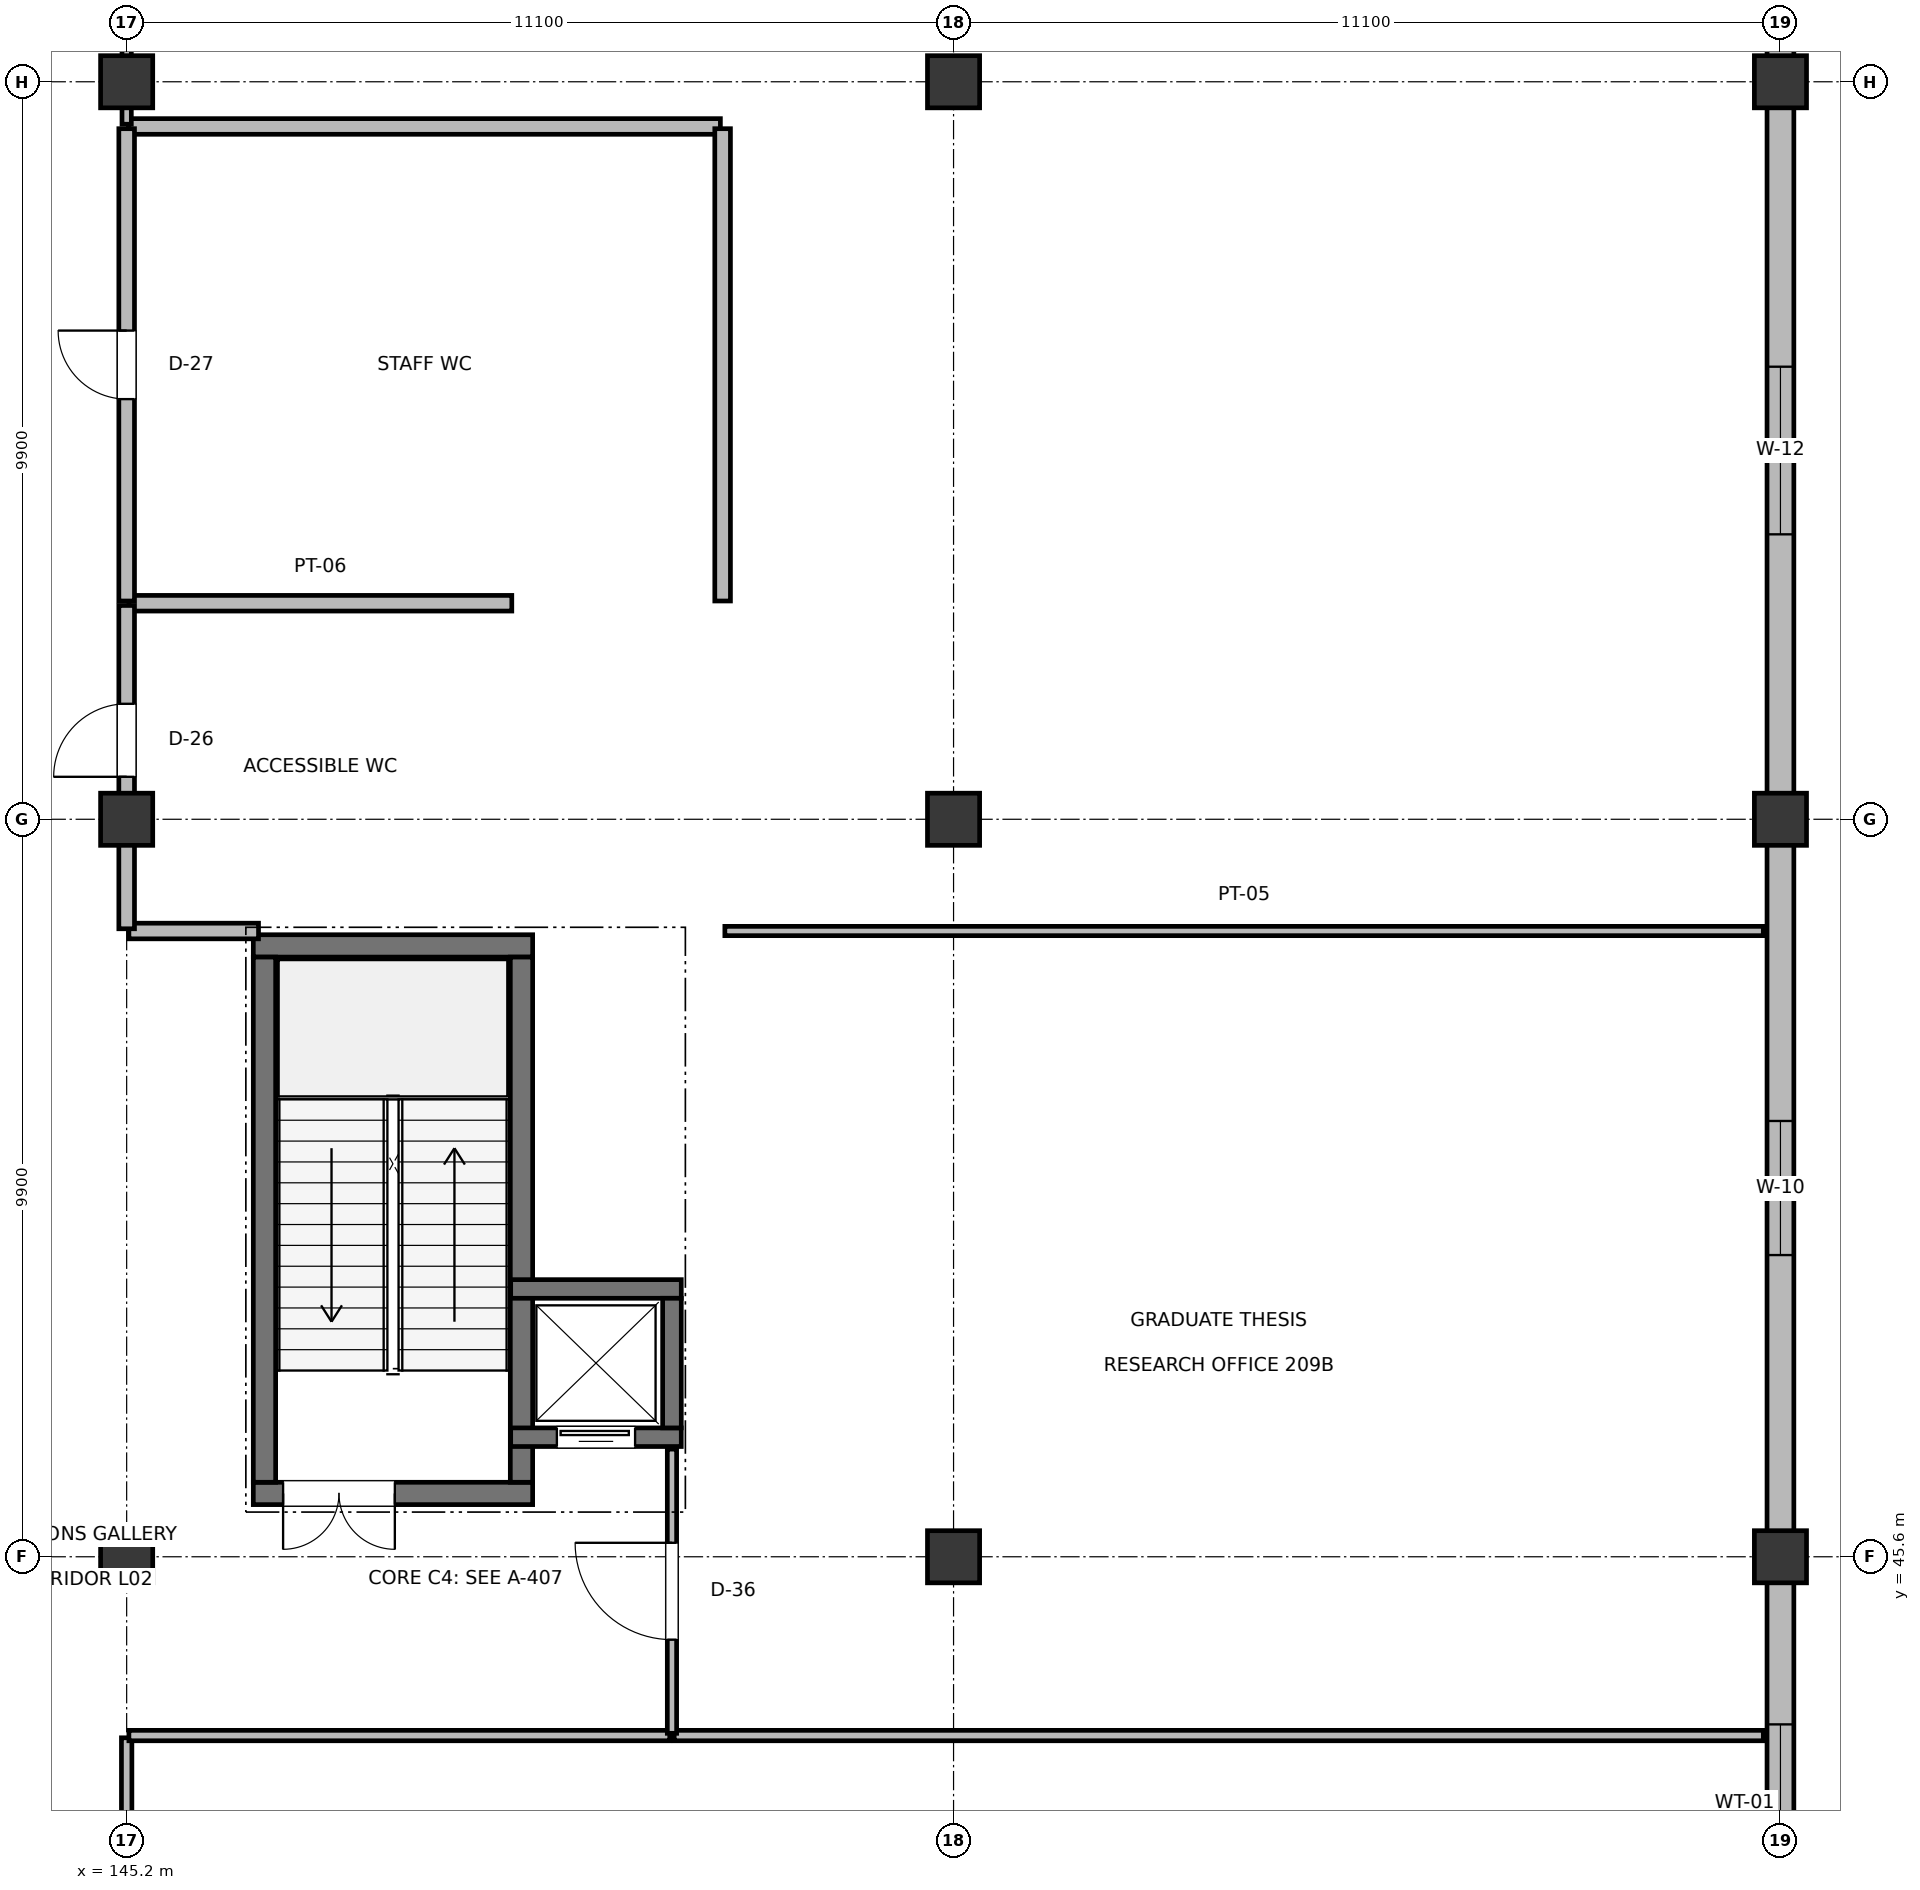
"""IFC4 building model, lengths in metres.
Left out: names, types, materials, properties, quantities, classifications, styles, units other than length and angle.
Written with IfcOpenShell. Run it as: python <this file> out.ifc"""

import sys

from ifc_helpers import new_model, si_unit, direction, frame, frame_2d, origin, origin_2d, place, context, subcontext, project, spatial, rectangle, extrude, element, fill, save


model = new_model("IFC4")
c1 = context("Model", 3, precision=1e-05, world=origin(), true_north=direction((0.0, 1.0)))
c2 = subcontext(c1, "Body", "Model", "MODEL_VIEW")
j1 = project(units=[si_unit("LENGTHUNIT", "METRE"), si_unit("PLANEANGLEUNIT", "RADIAN")], contexts=[c1])
p1 = place(None, origin())
s1 = spatial("IfcSite", under=j1, at=p1, CompositionType="ELEMENT")
p2 = place(p1, origin())
s2 = spatial("IfcBuilding", under=s1, at=p2, CompositionType="ELEMENT")
p3 = place(p2, frame((0.0, 0.0, 10.2)))
s3 = spatial("IfcBuildingStorey", under=s2, at=p3, CompositionType="ELEMENT", Elevation=10.2)
for number, where, z_axis, x_axis in (
    (1, (145.2, 45.6, 0.0), (0.0, 0.0, 1.0), (1.0, 0.0, 0.0)),
    (2, (145.2, 55.5, 0.0), (0.0, 0.0, 1.0), (1.0, 0.0, 0.0)),
    (3, (145.2, 65.4, 0.0), (0.0, 0.0, 1.0), (1.0, 0.0, 0.0)),
    (4, (156.3, 45.6, 0.0), (0.0, 0.0, 1.0), (1.0, 0.0, 0.0)),
    (5, (156.3, 55.5, 0.0), (0.0, 0.0, 1.0), (1.0, 0.0, 0.0)),
    (6, (156.3, 65.4, 0.0), (0.0, 0.0, 1.0), (1.0, 0.0, 0.0)),
    (7, (167.4, 45.6, 0.0), (0.0, 0.0, 1.0), (1.0, 0.0, 0.0)),
    (8, (167.4, 55.5, 0.0), (0.0, 0.0, 1.0), (1.0, 0.0, 0.0)),
    (9, (167.4, 65.4, 0.0), (0.0, 0.0, 1.0), (1.0, 0.0, 0.0)),
):
    element("IfcColumn", number, at=place(p3, frame(where, z_axis=z_axis, x_axis=x_axis)), inside=s3, PredefinedType="COLUMN", context=c2, shape_type="SweptSolid", body=[
        extrude(rectangle(XDim=0.7, YDim=0.7, at=origin_2d()), origin(), (0.0, 0.0, 1.0), 4.8),
    ])
p4 = place(p3, frame((167.4, 39.335, 0.0), z_axis=(0.0, 0.0, 1.0), x_axis=(0.0, 1.0, 0.0)))
e10 = element("IfcWall", 10, at=p4, inside=s3, PredefinedType="SOLIDWALL", context=c2, shape_type="SweptSolid", body=[
    extrude(rectangle(XDim=5.93, YDim=0.36, at=frame_2d((2.965, 0.0))), origin(), (0.0, 0.0, 1.0), 3.815),
])
p5 = place(p4, frame((1.915, 0.0, 0.85)))
e11 = element("IfcOpeningElement", 11, at=p5, cuts=e10, PredefinedType="OPENING", context=c2, shape_type="SweptSolid", body=[
    extrude(rectangle(XDim=2.1, YDim=1.9, at=frame_2d((1.05, 0.95))), frame((0.0, 0.19, 0.0), z_axis=(0.0, -1.0, 0.0), x_axis=(1.0, 0.0, 0.0)), (0.0, 0.0, 1.0), 0.38),
])
p6 = place(p3, frame((167.4, 45.935, 0.0), z_axis=(0.0, 0.0, 1.0), x_axis=(0.0, 1.0, 0.0)))
e12 = element("IfcWall", 12, at=p6, inside=s3, PredefinedType="SOLIDWALL", context=c2, shape_type="SweptSolid", body=[
    extrude(rectangle(XDim=9.23, YDim=0.36, at=frame_2d((4.615, 0.0))), origin(), (0.0, 0.0, 1.0), 3.815),
])
p7 = place(p6, frame((3.715, 0.0, 0.85)))
e13 = element("IfcOpeningElement", 13, at=p7, cuts=e12, PredefinedType="OPENING", context=c2, shape_type="SweptSolid", body=[
    extrude(rectangle(XDim=1.8, YDim=1.75, at=frame_2d((0.9, 0.875))), frame((0.0, 0.19, 0.0), z_axis=(0.0, -1.0, 0.0), x_axis=(1.0, 0.0, 0.0)), (0.0, 0.0, 1.0), 0.38),
])
p8 = place(p3, frame((167.4, 55.835, 0.0), z_axis=(0.0, 0.0, 1.0), x_axis=(0.0, 1.0, 0.0)))
e14 = element("IfcWall", 14, at=p8, inside=s3, PredefinedType="SOLIDWALL", context=c2, shape_type="SweptSolid", body=[
    extrude(rectangle(XDim=9.23, YDim=0.36, at=frame_2d((4.615, 0.0))), origin(), (0.0, 0.0, 1.0), 3.815),
])
p9 = place(p8, frame((3.49, 0.0, 0.85)))
e15 = element("IfcOpeningElement", 15, at=p9, cuts=e14, PredefinedType="OPENING", context=c2, shape_type="SweptSolid", body=[
    extrude(rectangle(XDim=2.25, YDim=1.85, at=frame_2d((1.125, 0.925))), frame((0.0, 0.19, 0.0), z_axis=(0.0, -1.0, 0.0), x_axis=(1.0, 0.0, 0.0)), (0.0, 0.0, 1.0), 0.38),
])
p10 = place(p3, frame((167.4, 65.735, 0.0), z_axis=(0.0, 0.0, 1.0), x_axis=(0.0, 1.0, 0.0)))
e16 = element("IfcWall", 16, at=p10, inside=s3, PredefinedType="SOLIDWALL", context=c2, shape_type="SweptSolid", body=[
    extrude(rectangle(XDim=10.13, YDim=0.36, at=frame_2d((5.065, 0.0))), origin(), (0.0, 0.0, 1.0), 3.815),
])
p11 = place(p10, frame((4.24, 0.0, 0.85)))
e17 = element("IfcOpeningElement", 17, at=p11, cuts=e16, PredefinedType="OPENING", context=c2, shape_type="SweptSolid", body=[
    extrude(rectangle(XDim=1.65, YDim=1.65, at=frame_2d((0.825, 0.825))), frame((0.0, 0.19, 0.0), z_axis=(0.0, -1.0, 0.0), x_axis=(1.0, 0.0, 0.0)), (0.0, 0.0, 1.0), 0.38),
])
p12 = place(p3, frame((146.9, 46.45, 0.0), z_axis=(0.0, 0.0, 1.0), x_axis=(1.0, 0.0, 0.0)))
e18 = element("IfcWall", 18, at=p12, inside=s3, PredefinedType="SHEAR", context=c2, shape_type="SweptSolid", body=[
    extrude(rectangle(XDim=3.75, YDim=0.3, at=frame_2d((1.875, 0.0))), origin(), (0.0, 0.0, 1.0), 4.58),
])
p13 = place(p12, frame((0.4, 0.0, 0.0)))
e19 = element("IfcOpeningElement", 19, at=p13, cuts=e18, PredefinedType="OPENING", context=c2, shape_type="SweptSolid", body=[
    extrude(rectangle(XDim=1.5, YDim=2.2, at=frame_2d((0.75, 1.1))), frame((0.0, 0.16, 0.0), z_axis=(0.0, -1.0, 0.0), x_axis=(1.0, 0.0, 0.0)), (0.0, 0.0, 1.0), 0.32),
])
p14 = place(p3, frame((146.9, 53.8, 0.0), z_axis=(0.0, 0.0, 1.0), x_axis=(1.0, 0.0, 0.0)))
e20 = element("IfcWall", 20, at=p14, inside=s3, PredefinedType="SHEAR", context=c2, shape_type="SweptSolid", body=[
    extrude(rectangle(XDim=3.75, YDim=0.3, at=frame_2d((1.875, 0.0))), origin(), (0.0, 0.0, 1.0), 4.58),
])
for number, where, z_axis, x_axis in (
    (21, (147.05, 46.6, 0.0), (0.0, 0.0, 1.0), (0.0, 1.0, 0.0)),
    (22, (150.5, 46.6, 0.0), (0.0, 0.0, 1.0), (0.0, 1.0, 0.0)),
):
    element("IfcWall", number, at=place(p3, frame(where, z_axis=z_axis, x_axis=x_axis)), inside=s3, PredefinedType="SHEAR", context=c2, shape_type="SweptSolid", body=[
        extrude(rectangle(XDim=7.05, YDim=0.3, at=frame_2d((3.525, 0.0))), origin(), (0.0, 0.0, 1.0), 4.58),
    ])
p15 = place(p3, frame((150.355, 47.205, 0.0), z_axis=(0.0, 0.0, 1.0), x_axis=(1.0, 0.0, 0.0)))
e23 = element("IfcWall", 23, at=p15, inside=s3, PredefinedType="SHEAR", context=c2, shape_type="SweptSolid", body=[
    extrude(rectangle(XDim=2.29, YDim=0.25, at=frame_2d((1.145, 0.0))), origin(), (0.0, 0.0, 1.0), 4.56),
])
p16 = place(p15, frame((0.62, 0.0, 0.0)))
e24 = element("IfcOpeningElement", 24, at=p16, cuts=e23, PredefinedType="OPENING", context=c2, shape_type="SweptSolid", body=[
    extrude(rectangle(XDim=1.05, YDim=2.15, at=frame_2d((0.525, 1.075))), frame((0.0, 0.135, 0.0), z_axis=(0.0, -1.0, 0.0), x_axis=(1.0, 0.0, 0.0)), (0.0, 0.0, 1.0), 0.27),
])
p17 = place(p3, frame((150.355, 49.195, 0.0), z_axis=(0.0, 0.0, 1.0), x_axis=(1.0, 0.0, 0.0)))
e25 = element("IfcWall", 25, at=p17, inside=s3, PredefinedType="SHEAR", context=c2, shape_type="SweptSolid", body=[
    extrude(rectangle(XDim=2.29, YDim=0.25, at=frame_2d((1.145, 0.0))), origin(), (0.0, 0.0, 1.0), 4.56),
])
p18 = place(p3, frame((152.52, 47.33, 0.0), z_axis=(0.0, 0.0, 1.0), x_axis=(0.0, 1.0, 0.0)))
e26 = element("IfcWall", 26, at=p18, inside=s3, PredefinedType="SHEAR", context=c2, shape_type="SweptSolid", body=[
    extrude(rectangle(XDim=1.74, YDim=0.25, at=frame_2d((0.87, 0.0))), origin(), (0.0, 0.0, 1.0), 4.56),
])
p19 = place(p3, frame((152.55, 43.2, 0.0), z_axis=(0.0, 0.0, 1.0), x_axis=(1.0, 0.0, 0.0)))
e27 = element("IfcWall", 27, at=p19, inside=s3, PredefinedType="PARTITIONING", context=c2, shape_type="SweptSolid", body=[
    extrude(rectangle(XDim=14.62, YDim=0.14, at=frame_2d((7.31, 0.0))), origin(), (0.0, 0.0, 1.0), 3.815),
])
p20 = place(p3, frame((145.2, 12.23, 0.0), z_axis=(0.0, 0.0, 1.0), x_axis=(0.0, 1.0, 0.0)))
e28 = element("IfcWall", 28, at=p20, inside=s3, PredefinedType="PARTITIONING", context=c2, shape_type="SweptSolid", body=[
    extrude(rectangle(XDim=30.94, YDim=0.14, at=frame_2d((15.47, 0.0))), origin(), (0.0, 0.0, 1.0), 3.665),
])
p21 = place(p20, frame((15.02, 0.0, 0.0)))
e29 = element("IfcOpeningElement", 29, at=p21, cuts=e28, PredefinedType="OPENING", context=c2, shape_type="SweptSolid", body=[
    extrude(rectangle(XDim=0.9, YDim=2.05, at=frame_2d((0.45, 1.025))), frame((0.0, 0.08, 0.0), z_axis=(0.0, -1.0, 0.0), x_axis=(1.0, 0.0, 0.0)), (0.0, 0.0, 1.0), 0.16),
])
p22 = place(p3, frame((145.23, 43.2, 0.0), z_axis=(0.0, 0.0, 1.0), x_axis=(1.0, 0.0, 0.0)))
e30 = element("IfcWall", 30, at=p22, inside=s3, PredefinedType="PARTITIONING", context=c2, shape_type="SweptSolid", body=[
    extrude(rectangle(XDim=7.26, YDim=0.14, at=frame_2d((3.63, 0.0))), origin(), (0.0, 0.0, 1.0), 3.865),
])
p23 = place(p3, frame((153.23, 54.0, 0.0), z_axis=(0.0, 0.0, 1.0), x_axis=(1.0, 0.0, 0.0)))
e31 = element("IfcWall", 31, at=p23, inside=s3, PredefinedType="PARTITIONING", context=c2, shape_type="SweptSolid", body=[
    extrude(rectangle(XDim=13.94, YDim=0.125, at=frame_2d((6.97, 0.0))), origin(), (0.0, 0.0, 1.0), 3.665),
])
p24 = place(p3, frame((152.52, 43.23, 0.0), z_axis=(0.0, 0.0, 1.0), x_axis=(0.0, 1.0, 0.0)))
e32 = element("IfcWall", 32, at=p24, inside=s3, PredefinedType="PARTITIONING", context=c2, shape_type="SweptSolid", body=[
    extrude(rectangle(XDim=3.815, YDim=0.125, at=frame_2d((1.907, 0.0))), origin(), (0.0, 0.0, 1.0), 3.935),
])
p25 = place(p24, frame((1.258, 0.0, 0.0)))
e33 = element("IfcOpeningElement", 33, at=p25, cuts=e32, PredefinedType="OPENING", context=c2, shape_type="SweptSolid", body=[
    extrude(rectangle(XDim=1.3, YDim=2.2, at=frame_2d((0.65, 1.1))), frame((0.0, 0.073, 0.0), z_axis=(0.0, -1.0, 0.0), x_axis=(1.0, 0.0, 0.0)), (0.0, 0.0, 1.0), 0.145),
])
p26 = place(p3, frame((145.23, 58.4, 0.0), z_axis=(0.0, 0.0, 1.0), x_axis=(1.0, 0.0, 0.0)))
e34 = element("IfcWall", 34, at=p26, inside=s3, PredefinedType="PLUMBINGWALL", context=c2, shape_type="SweptSolid", body=[
    extrude(rectangle(XDim=5.14, YDim=0.21, at=frame_2d((2.57, 0.0))), origin(), (0.0, 0.0, 1.0), 3.665),
])
p27 = place(p3, frame((145.23, 54.0, 0.0), z_axis=(0.0, 0.0, 1.0), x_axis=(1.0, 0.0, 0.0)))
e35 = element("IfcWall", 35, at=p27, inside=s3, PredefinedType="PLUMBINGWALL", context=c2, shape_type="SweptSolid", body=[
    extrude(rectangle(XDim=1.74, YDim=0.21, at=frame_2d((0.87, 0.0))), origin(), (0.0, 0.0, 1.0), 3.665),
])
p28 = place(p3, frame((145.2, 54.03, 0.0), z_axis=(0.0, 0.0, 1.0), x_axis=(0.0, 1.0, 0.0)))
e36 = element("IfcWall", 36, at=p28, inside=s3, PredefinedType="PLUMBINGWALL", context=c2, shape_type="SweptSolid", body=[
    extrude(rectangle(XDim=4.34, YDim=0.21, at=frame_2d((2.17, 0.0))), origin(), (0.0, 0.0, 1.0), 3.665),
])
p29 = place(p28, frame((2.04, 0.0, 0.0)))
e37 = element("IfcOpeningElement", 37, at=p29, cuts=e36, PredefinedType="OPENING", context=c2, shape_type="SweptSolid", body=[
    extrude(rectangle(XDim=0.98, YDim=2.1, at=frame_2d((0.49, 1.05))), frame((0.0, 0.115, 0.0), z_axis=(0.0, -1.0, 0.0), x_axis=(1.0, 0.0, 0.0)), (0.0, 0.0, 1.0), 0.23),
])
p30 = place(p3, frame((145.23, 64.8, 0.0), z_axis=(0.0, 0.0, 1.0), x_axis=(1.0, 0.0, 0.0)))
e38 = element("IfcWall", 38, at=p30, inside=s3, PredefinedType="PLUMBINGWALL", context=c2, shape_type="SweptSolid", body=[
    extrude(rectangle(XDim=7.94, YDim=0.21, at=frame_2d((3.97, 0.0))), origin(), (0.0, 0.0, 1.0), 3.665),
])
p31 = place(p3, frame((153.2, 58.43, 0.0), z_axis=(0.0, 0.0, 1.0), x_axis=(0.0, 1.0, 0.0)))
e39 = element("IfcWall", 39, at=p31, inside=s3, PredefinedType="PLUMBINGWALL", context=c2, shape_type="SweptSolid", body=[
    extrude(rectangle(XDim=6.34, YDim=0.21, at=frame_2d((3.17, 0.0))), origin(), (0.0, 0.0, 1.0), 4.48),
])
p32 = place(p3, frame((145.2, 58.43, 0.0), z_axis=(0.0, 0.0, 1.0), x_axis=(0.0, 1.0, 0.0)))
e40 = element("IfcWall", 40, at=p32, inside=s3, PredefinedType="PLUMBINGWALL", context=c2, shape_type="SweptSolid", body=[
    extrude(rectangle(XDim=6.34, YDim=0.21, at=frame_2d((3.17, 0.0))), origin(), (0.0, 0.0, 1.0), 3.665),
])
p33 = place(p32, frame((2.71, 0.0, 0.0)))
e41 = element("IfcOpeningElement", 41, at=p33, cuts=e40, PredefinedType="OPENING", context=c2, shape_type="SweptSolid", body=[
    extrude(rectangle(XDim=0.92, YDim=2.1, at=frame_2d((0.46, 1.05))), frame((0.0, 0.115, 0.0), z_axis=(0.0, -1.0, 0.0), x_axis=(1.0, 0.0, 0.0)), (0.0, 0.0, 1.0), 0.23),
])
p34 = place(p3, frame((145.2, 64.83, 0.0), z_axis=(0.0, 0.0, 1.0), x_axis=(0.0, 1.0, 0.0)))
e42 = element("IfcWall", 42, at=p34, inside=s3, PredefinedType="PARTITIONING", context=c2, shape_type="SweptSolid", body=[
    extrude(rectangle(XDim=11.14, YDim=0.125, at=frame_2d((5.57, 0.0))), origin(), (0.0, 0.0, 1.0), 3.665),
])
p35 = place(p34, frame((5.07, 0.0, 0.0)))
e43 = element("IfcOpeningElement", 43, at=p35, cuts=e42, PredefinedType="OPENING", context=c2, shape_type="SweptSolid", body=[
    extrude(rectangle(XDim=1.0, YDim=2.15, at=frame_2d((0.5, 1.075))), frame((0.0, 0.073, 0.0), z_axis=(0.0, -1.0, 0.0), x_axis=(1.0, 0.0, 0.0)), (0.0, 0.0, 1.0), 0.145),
])
p36 = place(p5, frame((2.1, 0.0, 0.0), z_axis=(0.0, 0.0, 1.0), x_axis=(-1.0, 0.0, 0.0)))
e44 = element("IfcWindow", 44, at=p36, inside=s3, PartitioningType="DOUBLE_PANEL_VERTICAL", PredefinedType="WINDOW", context=c2, shape_type="SweptSolid", body=[
    extrude(rectangle(XDim=2.1, YDim=1.9, at=frame_2d((1.05, 0.95))), frame((0.0, 0.03, 0.0), z_axis=(0.0, -1.0, 0.0), x_axis=(1.0, 0.0, 0.0)), (0.0, 0.0, 1.0), 0.06),
])
fill(e11, e44)
p37 = place(p7, frame((1.8, 0.0, 0.0), z_axis=(0.0, 0.0, 1.0), x_axis=(-1.0, 0.0, 0.0)))
e45 = element("IfcWindow", 45, at=p37, inside=s3, PartitioningType="DOUBLE_PANEL_HORIZONTAL", PredefinedType="WINDOW", context=c2, shape_type="SweptSolid", body=[
    extrude(rectangle(XDim=1.8, YDim=1.75, at=frame_2d((0.9, 0.875))), frame((0.0, 0.03, 0.0), z_axis=(0.0, -1.0, 0.0), x_axis=(1.0, 0.0, 0.0)), (0.0, 0.0, 1.0), 0.06),
])
fill(e13, e45)
p38 = place(p9, frame((2.25, 0.0, 0.0), z_axis=(0.0, 0.0, 1.0), x_axis=(-1.0, 0.0, 0.0)))
e46 = element("IfcWindow", 46, at=p38, inside=s3, PartitioningType="DOUBLE_PANEL_VERTICAL", PredefinedType="WINDOW", context=c2, shape_type="SweptSolid", body=[
    extrude(rectangle(XDim=2.25, YDim=1.85, at=frame_2d((1.125, 0.925))), frame((0.0, 0.03, 0.0), z_axis=(0.0, -1.0, 0.0), x_axis=(1.0, 0.0, 0.0)), (0.0, 0.0, 1.0), 0.06),
])
fill(e15, e46)
p39 = place(p13, frame((1.5, 0.0, 0.0), z_axis=(0.0, 0.0, 1.0), x_axis=(-1.0, 0.0, 0.0)))
e47 = element("IfcDoor", 47, at=p39, inside=s3, OperationType="DOUBLE_DOOR_SINGLE_SWING", PredefinedType="DOOR", context=c2, shape_type="SweptSolid", body=[
    extrude(rectangle(XDim=1.5, YDim=2.2, at=frame_2d((0.75, 1.1))), frame((0.0, 0.025, 0.0), z_axis=(0.0, -1.0, 0.0), x_axis=(1.0, 0.0, 0.0)), (0.0, 0.0, 1.0), 0.05),
])
fill(e19, e47)
p40 = place(p16, frame((1.05, 0.0, 0.0), z_axis=(0.0, 0.0, 1.0), x_axis=(-1.0, 0.0, 0.0)))
e48 = element("IfcDoor", 48, at=p40, inside=s3, OperationType="SLIDING_TO_RIGHT", PredefinedType="DOOR", context=c2, shape_type="SweptSolid", body=[
    extrude(rectangle(XDim=1.05, YDim=2.15, at=frame_2d((0.525, 1.075))), frame((0.0, 0.025, 0.0), z_axis=(0.0, -1.0, 0.0), x_axis=(1.0, 0.0, 0.0)), (0.0, 0.0, 1.0), 0.05),
])
fill(e24, e48)
p41 = place(p25, origin())
e49 = element("IfcDoor", 49, at=p41, inside=s3, OperationType="SINGLE_SWING_RIGHT", PredefinedType="DOOR", context=c2, shape_type="SweptSolid", body=[
    extrude(rectangle(XDim=1.3, YDim=2.2, at=frame_2d((0.65, 1.1))), frame((0.0, 0.025, 0.0), z_axis=(0.0, -1.0, 0.0), x_axis=(1.0, 0.0, 0.0)), (0.0, 0.0, 1.0), 0.05),
])
fill(e33, e49)
p42 = place(p29, origin())
e50 = element("IfcDoor", 50, at=p42, inside=s3, OperationType="SINGLE_SWING_LEFT", PredefinedType="DOOR", context=c2, shape_type="SweptSolid", body=[
    extrude(rectangle(XDim=0.98, YDim=2.1, at=frame_2d((0.49, 1.05))), frame((0.0, 0.025, 0.0), z_axis=(0.0, -1.0, 0.0), x_axis=(1.0, 0.0, 0.0)), (0.0, 0.0, 1.0), 0.05),
])
fill(e37, e50)
p43 = place(p33, origin())
e51 = element("IfcDoor", 51, at=p43, inside=s3, OperationType="SINGLE_SWING_RIGHT", PredefinedType="DOOR", context=c2, shape_type="SweptSolid", body=[
    extrude(rectangle(XDim=0.92, YDim=2.1, at=frame_2d((0.46, 1.05))), frame((0.0, 0.025, 0.0), z_axis=(0.0, -1.0, 0.0), x_axis=(1.0, 0.0, 0.0)), (0.0, 0.0, 1.0), 0.05),
])
fill(e41, e51)
save(model, sys.argv[1])
